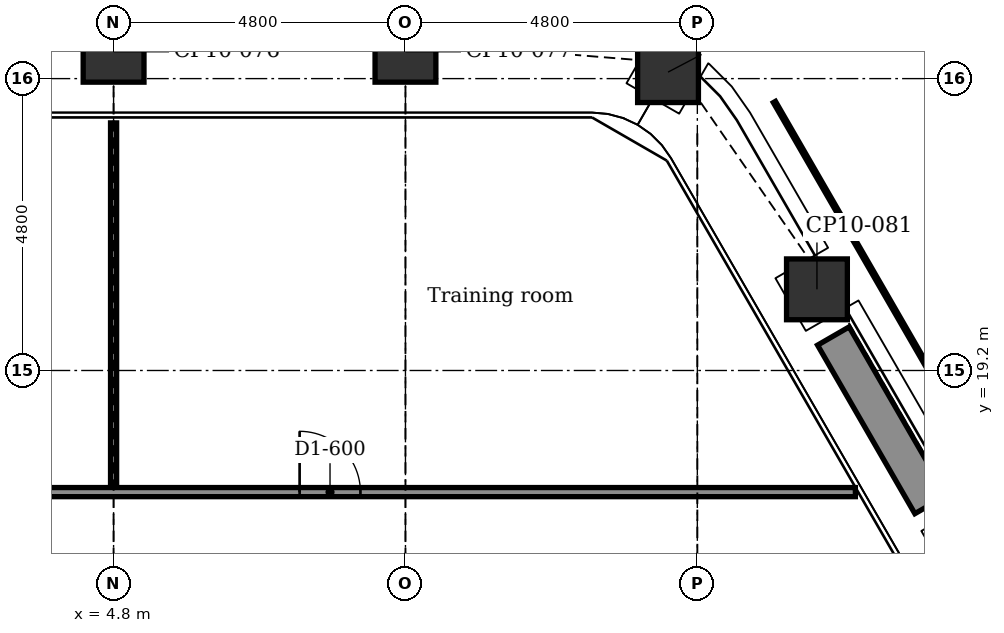
"""IFC4 building model, lengths in metres.
Left out: names, types, materials, properties, quantities, classifications, styles, units other than length and angle.
Written with IfcOpenShell. Run it as: python <this file> out.ifc"""

import sys

from ifc_helpers import new_model, si_unit, direction, frame, frame_2d, origin, origin_2d, place, context, subcontext, project, spatial, rectangle, extrude, element, fill, save


model = new_model("IFC4")
c1 = context("Model", 3, precision=1e-05, world=origin(), true_north=direction((0.0, 1.0)))
c2 = subcontext(c1, "Body", "Model", "MODEL_VIEW")
j1 = project(units=[si_unit("LENGTHUNIT", "METRE"), si_unit("PLANEANGLEUNIT", "RADIAN")], contexts=[c1])
p1 = place(None, origin())
s1 = spatial("IfcSite", under=j1, at=p1, CompositionType="ELEMENT")
p2 = place(p1, origin())
s2 = spatial("IfcBuilding", under=s1, at=p2, CompositionType="ELEMENT")
p3 = place(p2, frame((0.0, 0.0, 212.9)))
s3 = spatial("IfcBuildingStorey", under=s2, at=p3, CompositionType="ELEMENT", Elevation=212.9)
for number, where, z_axis, x_axis in (
    (1, (4.8, 24.442, -0.15), (0.0, 0.0, 1.0), (1.0, 0.0, 0.0)),
    (2, (9.6, 24.442, -0.15), (0.0, 0.0, 1.0), (1.0, 0.0, 0.0)),
    (3, (13.918, 24.107, -0.15), (0.0, 0.0, 1.0), (0.5, 0.866, 0.0)),
    (4, (16.367, 20.535, -0.15), (0.0, 0.0, 1.0), (0.866, 0.5, 0.0)),
    (5, (18.767, 16.378, -0.15), (0.0, 0.0, 1.0), (0.866, 0.5, 0.0)),
):
    element("IfcColumn", number, at=place(p3, frame(where, z_axis=z_axis, x_axis=x_axis)), inside=s3, PredefinedType="COLUMN", context=c2, shape_type="SweptSolid", body=[
        extrude(rectangle(XDim=1.0, YDim=1.0, at=origin_2d()), origin(), (0.0, 0.0, 1.0), 3.75),
    ])
p4 = place(p3, frame((16.637, 19.767, 0.0), z_axis=(0.0, 0.0, 1.0), x_axis=(0.500028443584, -0.866008981251, 0.0)))
e6 = element("IfcWall", 6, at=p4, inside=s3, PredefinedType="USERDEFINED", context=c2, shape_type="SweptSolid", body=[
    extrude(rectangle(XDim=3.2, YDim=0.6, at=frame_2d((1.6, 0.0))), origin(), (0.0, 0.0, 1.0), 0.7),
])
p5 = place(p3, frame((4.8, 17.2, 0.0), z_axis=(0.0, 0.0, 1.0), x_axis=(0.0, 1.0, 0.0)))
e7 = element("IfcWall", 7, at=p5, inside=s3, PredefinedType="PARTITIONING", context=c2, shape_type="SweptSolid", body=[
    extrude(rectangle(XDim=6.072, YDim=0.1, at=frame_2d((3.036, 0.0))), origin(), (0.0, 0.0, 1.0), 2.838),
])
p6 = place(p3, frame((-16.999, 17.2, 0.0), z_axis=(0.0, 0.0, 1.0), x_axis=(1.0, 0.0, 0.0)))
e8 = element("IfcWall", 8, at=p6, inside=s3, PredefinedType="PARTITIONING", context=c2, shape_type="SweptSolid", body=[
    extrude(rectangle(XDim=33.998, YDim=0.15, at=frame_2d((16.999, 0.0))), origin(), (0.0, 0.0, 1.0), 3.6),
])
p7 = place(p6, frame((1.052, 0.0, 0.0)))
e9 = element("IfcOpeningElement", 9, at=p7, cuts=e8, PredefinedType="OPENING", context=c2, shape_type="SweptSolid", body=[
    extrude(rectangle(XDim=1.0, YDim=2.1, at=frame_2d((0.5, 1.05))), frame((0.0, 0.085, 0.0), z_axis=(0.0, -1.0, 0.0), x_axis=(1.0, 0.0, 0.0)), (0.0, 0.0, 1.0), 0.17),
])
p8 = place(p6, frame((10.024, 0.0, 0.0)))
e10 = element("IfcOpeningElement", 10, at=p8, cuts=e8, PredefinedType="OPENING", context=c2, shape_type="SweptSolid", body=[
    extrude(rectangle(XDim=1.0, YDim=2.1, at=frame_2d((0.5, 1.05))), frame((0.0, 0.085, 0.0), z_axis=(0.0, -1.0, 0.0), x_axis=(1.0, 0.0, 0.0)), (0.0, 0.0, 1.0), 0.17),
])
p9 = place(p6, frame((13.084, 0.0, 0.0)))
e11 = element("IfcOpeningElement", 11, at=p9, cuts=e8, PredefinedType="OPENING", context=c2, shape_type="SweptSolid", body=[
    extrude(rectangle(XDim=1.0, YDim=2.1, at=frame_2d((0.5, 1.05))), frame((0.0, 0.085, 0.0), z_axis=(0.0, -1.0, 0.0), x_axis=(1.0, 0.0, 0.0)), (0.0, 0.0, 1.0), 0.17),
])
p10 = place(p6, frame((17.884, 0.0, 0.0)))
e12 = element("IfcOpeningElement", 12, at=p10, cuts=e8, PredefinedType="OPENING", context=c2, shape_type="SweptSolid", body=[
    extrude(rectangle(XDim=1.0, YDim=2.1, at=frame_2d((0.5, 1.05))), frame((0.0, 0.085, 0.0), z_axis=(0.0, -1.0, 0.0), x_axis=(1.0, 0.0, 0.0)), (0.0, 0.0, 1.0), 0.17),
])
p11 = place(p6, frame((24.858, 0.0, 0.0)))
e13 = element("IfcOpeningElement", 13, at=p11, cuts=e8, PredefinedType="OPENING", context=c2, shape_type="SweptSolid", body=[
    extrude(rectangle(XDim=1.0, YDim=2.1, at=frame_2d((0.5, 1.05))), frame((0.0, 0.085, 0.0), z_axis=(0.0, -1.0, 0.0), x_axis=(1.0, 0.0, 0.0)), (0.0, 0.0, 1.0), 0.17),
])
p12 = place(p11, origin())
e14 = element("IfcDoor", 14, at=p12, inside=s3, OperationType="SINGLE_SWING_LEFT", PredefinedType="DOOR", context=c2, shape_type="SweptSolid", body=[
    extrude(rectangle(XDim=1.0, YDim=2.1, at=frame_2d((0.5, 1.05))), frame((0.0, 0.025, 0.0), z_axis=(0.0, -1.0, 0.0), x_axis=(1.0, 0.0, 0.0)), (0.0, 0.0, 1.0), 0.05),
])
fill(e13, e14)
save(model, sys.argv[1])
